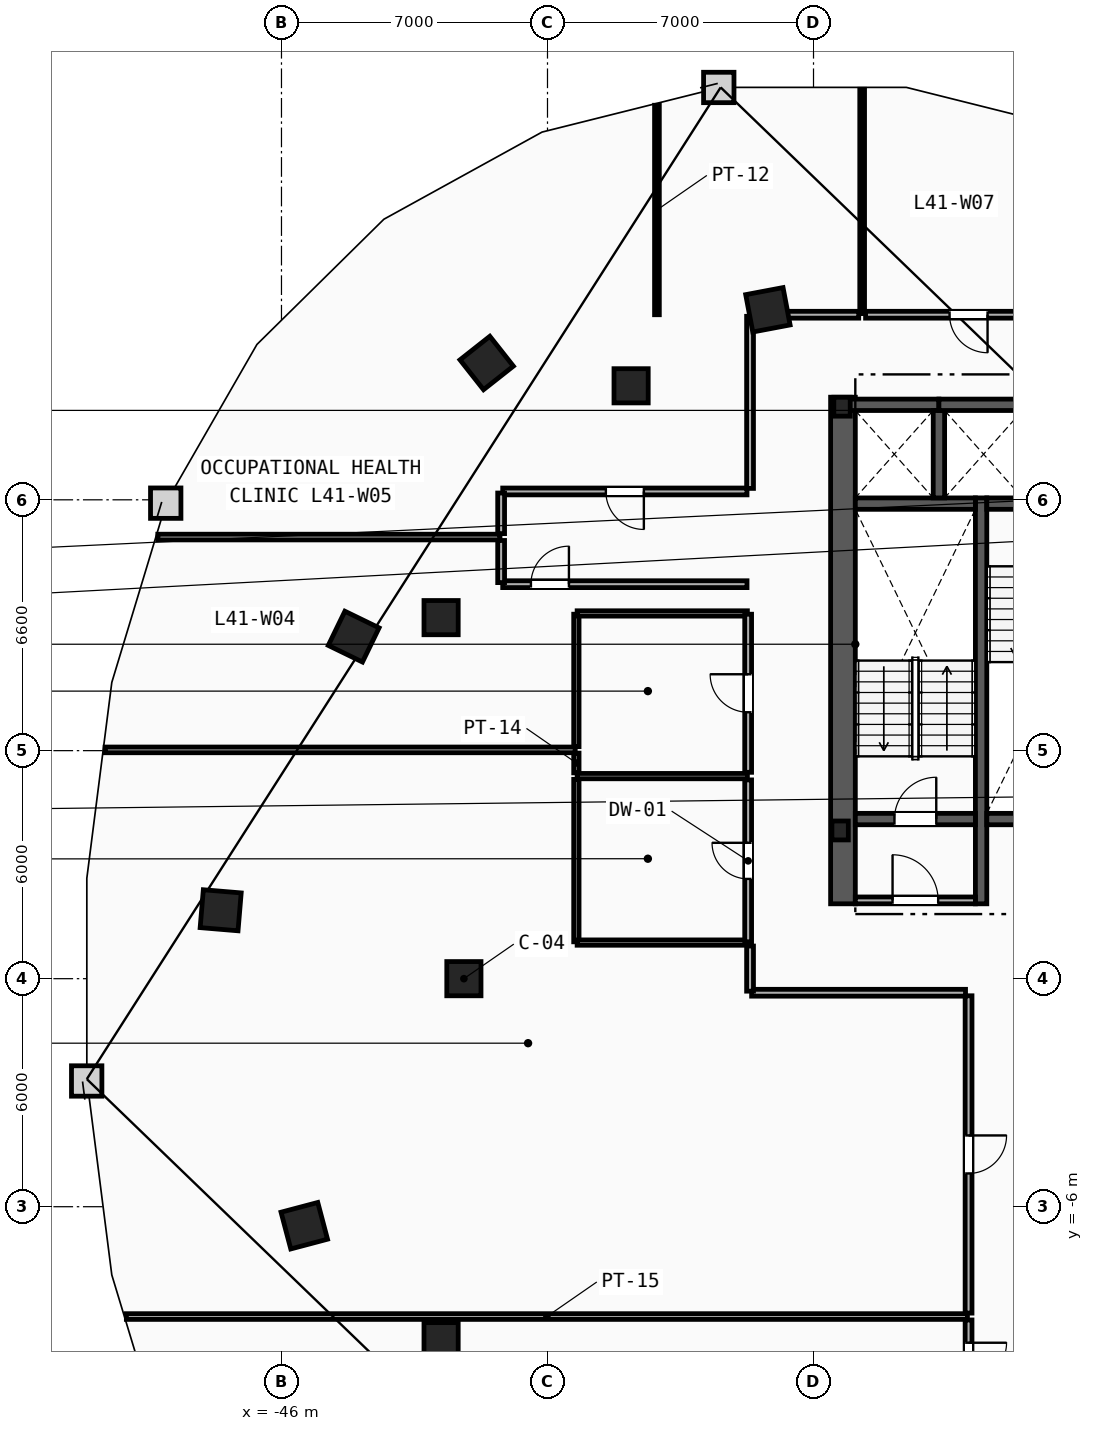
"""IFC4 building model, lengths in metres.
Left out: names, types, materials, properties, quantities, classifications, styles, units other than length and angle.
Written with IfcOpenShell. Run it as: python <this file> out.ifc"""

import sys

from ifc_helpers import new_model, si_unit, direction, frame, frame_2d, origin, origin_2d, place, context, subcontext, project, spatial, rectangle, i_section, extrude, element, fill, save


model = new_model("IFC4")
c1 = context("Model", 3, precision=1e-05, world=origin(), true_north=direction((0.0, 1.0)))
c2 = subcontext(c1, "Body", "Model", "MODEL_VIEW")
j1 = project(units=[si_unit("LENGTHUNIT", "METRE"), si_unit("PLANEANGLEUNIT", "RADIAN")], contexts=[c1])
p1 = place(None, origin())
s1 = spatial("IfcSite", under=j1, at=p1, CompositionType="ELEMENT")
p2 = place(p1, origin())
s2 = spatial("IfcBuilding", under=s1, at=p2, CompositionType="ELEMENT")
p3 = place(p2, frame((0.0, 0.0, 158.4)))
s3 = spatial("IfcBuildingStorey", under=s2, at=p3, CompositionType="ELEMENT", Elevation=158.4)
for number, where, z_axis, x_axis in (
    (1, (-31.3, 3.9, 0.0), (0.0, 0.0, 1.0), (1.0, 0.0, 0.0)),
    (2, (-31.25, 15.05, 0.0), (0.0, 0.0, 1.0), (1.0, 0.0, 0.0)),
):
    element("IfcColumn", number, at=place(p3, frame(where, z_axis=z_axis, x_axis=x_axis)), inside=s3, PredefinedType="COLUMN", context=c2, shape_type="SweptSolid", body=[
        extrude(i_section(OverallWidth=0.432, OverallDepth=0.498, WebThickness=0.056, FlangeThickness=0.089, FilletRadius=0.018, at=origin_2d()), origin(), (0.0, 0.0, 1.0), 3.6),
    ])
for number, where, z_axis, x_axis in (
    (3, (-41.2, 0.0, 0.0), (0.0, 0.0, 1.0), (1.0, 0.0, 0.0)),
    (4, (-41.8, 9.5, 0.0), (0.0, 0.0, 1.0), (1.0, 0.0, 0.0)),
    (5, (-36.8, 15.6, 0.0), (0.0, 0.0, 1.0), (1.0, 0.0, 0.0)),
    (6, (-41.8, -9.5, 0.0), (0.0, 0.0, 1.0), (1.0, 0.0, 0.0)),
):
    element("IfcColumn", number, at=place(p3, frame(where, z_axis=z_axis, x_axis=x_axis)), inside=s3, PredefinedType="COLUMN", context=c2, shape_type="SweptSolid", body=[
        extrude(rectangle(XDim=0.9, YDim=0.9, at=origin_2d()), origin(), (0.0, 0.0, 1.0), 3.6),
    ])
for number, where, z_axis, x_axis in (
    (7, (-33.2, 17.6, 0.0), (0.0, 0.0, 1.0), (-0.983, -0.186, 0.0)),
    (8, (-40.6, 16.2, 0.0), (0.0, 0.0, 1.0), (-0.785, -0.619, 0.0)),
    (9, (-44.1, 9.0, 0.0), (0.0, 0.0, 1.0), (-0.437, -0.899, 0.0)),
    (10, (-47.6, 1.8, 0.0), (0.0, 0.0, 1.0), (-0.084, -0.997, 0.0)),
    (11, (-45.4, -6.5, 0.0), (0.0, 0.0, 1.0), (0.256, -0.967, 0.0)),
):
    element("IfcColumn", number, at=place(p3, frame(where, z_axis=z_axis, x_axis=x_axis)), inside=s3, PredefinedType="COLUMN", context=c2, shape_type="SweptSolid", body=[
        extrude(rectangle(XDim=1.0, YDim=1.0, at=origin_2d()), origin(), (0.0, 0.0, 1.0), 3.6),
    ])
p4 = place(p3, frame((-31.225, 1.97, 0.0), z_axis=(0.0, 0.0, 1.0), x_axis=(0.0, 1.0, 0.0)))
e12 = element("IfcWall", 12, at=p4, inside=s3, PredefinedType="SHEAR", context=c2, shape_type="SweptSolid", body=[
    extrude(rectangle(XDim=13.33, YDim=0.65, at=frame_2d((6.665, 0.0))), origin(), (0.0, 0.0, 1.0), 3.36),
])
p5 = place(p3, frame((-27.59, 1.97, 0.0), z_axis=(0.0, 0.0, 1.0), x_axis=(0.0, 1.0, 0.0)))
e13 = element("IfcWall", 13, at=p5, inside=s3, PredefinedType="SHEAR", context=c2, shape_type="SweptSolid", body=[
    extrude(rectangle(XDim=10.68, YDim=0.3, at=frame_2d((5.34, 0.0))), origin(), (0.0, 0.0, 1.0), 3.36),
])
p6 = place(p3, frame((-30.9, 4.2, 0.0), z_axis=(0.0, 0.0, 1.0), x_axis=(1.0, 0.0, 0.0)))
e14 = element("IfcWall", 14, at=p6, inside=s3, PredefinedType="SHEAR", context=c2, shape_type="SweptSolid", body=[
    extrude(rectangle(XDim=3.16, YDim=0.3, at=frame_2d((1.58, 0.0))), origin(), (0.0, 0.0, 1.0), 3.36),
])
p7 = place(p6, frame((1.03, 0.0, 0.0)))
e15 = element("IfcOpeningElement", 15, at=p7, cuts=e14, PredefinedType="OPENING", context=c2, shape_type="SweptSolid", body=[
    extrude(rectangle(XDim=1.1, YDim=2.15, at=frame_2d((0.55, 1.075))), frame((0.0, 0.16, 0.0), z_axis=(0.0, -1.0, 0.0), x_axis=(1.0, 0.0, 0.0)), (0.0, 0.0, 1.0), 0.32),
])
p8 = place(p3, frame((-30.9, 12.5, 0.0), z_axis=(0.0, 0.0, 1.0), x_axis=(1.0, 0.0, 0.0)))
e16 = element("IfcWall", 16, at=p8, inside=s3, PredefinedType="SHEAR", context=c2, shape_type="SweptSolid", body=[
    extrude(rectangle(XDim=3.16, YDim=0.3, at=frame_2d((1.58, 0.0))), origin(), (0.0, 0.0, 1.0), 3.36),
])
p9 = place(p3, frame((-27.44, 12.5, 0.0), z_axis=(0.0, 0.0, 1.0), x_axis=(1.0, 0.0, 0.0)))
e17 = element("IfcWall", 17, at=p9, inside=s3, PredefinedType="SHEAR", context=c2, shape_type="SweptSolid", body=[
    extrude(rectangle(XDim=3.16, YDim=0.3, at=frame_2d((1.58, 0.0))), origin(), (0.0, 0.0, 1.0), 3.36),
])
p10 = place(p9, frame((1.03, 0.0, 0.0)))
e18 = element("IfcOpeningElement", 18, at=p10, cuts=e17, PredefinedType="OPENING", context=c2, shape_type="SweptSolid", body=[
    extrude(rectangle(XDim=1.1, YDim=2.15, at=frame_2d((0.55, 1.075))), frame((0.0, 0.16, 0.0), z_axis=(0.0, -1.0, 0.0), x_axis=(1.0, 0.0, 0.0)), (0.0, 0.0, 1.0), 0.32),
])
p11 = place(p3, frame((-27.44, 4.2, 0.0), z_axis=(0.0, 0.0, 1.0), x_axis=(1.0, 0.0, 0.0)))
e19 = element("IfcWall", 19, at=p11, inside=s3, PredefinedType="SHEAR", context=c2, shape_type="SweptSolid", body=[
    extrude(rectangle(XDim=3.16, YDim=0.3, at=frame_2d((1.58, 0.0))), origin(), (0.0, 0.0, 1.0), 3.36),
])
p12 = place(p3, frame((-30.9, 2.06, 0.0), z_axis=(0.0, 0.0, 1.0), x_axis=(1.0, 0.0, 0.0)))
e20 = element("IfcWall", 20, at=p12, inside=s3, PredefinedType="PARTITIONING", context=c2, shape_type="SweptSolid", body=[
    extrude(rectangle(XDim=3.16, YDim=0.18, at=frame_2d((1.58, 0.0))), origin(), (0.0, 0.0, 1.0), 3.36),
])
p13 = place(p12, frame((0.98, 0.0, 0.0)))
e21 = element("IfcOpeningElement", 21, at=p13, cuts=e20, PredefinedType="OPENING", context=c2, shape_type="SweptSolid", body=[
    extrude(rectangle(XDim=1.2, YDim=2.15, at=frame_2d((0.6, 1.075))), frame((0.0, 0.1, 0.0), z_axis=(0.0, -1.0, 0.0), x_axis=(1.0, 0.0, 0.0)), (0.0, 0.0, 1.0), 0.2),
])
p14 = place(p3, frame((-31.2, 15.1, 0.0), z_axis=(0.0, 0.0, 1.0), x_axis=(1.0, 0.0, 0.0)))
e22 = element("IfcWall", 22, at=p14, inside=s3, PredefinedType="SHEAR", context=c2, shape_type="SweptSolid", body=[
    extrude(rectangle(XDim=2.5, YDim=0.3, at=frame_2d((1.25, 0.0))), origin(), (0.0, 0.0, 1.0), 3.36),
])
p15 = place(p3, frame((-28.7, 12.65, 0.0), z_axis=(0.0, 0.0, 1.0), x_axis=(0.0, 1.0, 0.0)))
e23 = element("IfcWall", 23, at=p15, inside=s3, PredefinedType="SHEAR", context=c2, shape_type="SweptSolid", body=[
    extrude(rectangle(XDim=2.3, YDim=0.3, at=frame_2d((1.15, 0.0))), origin(), (0.0, 0.0, 1.0), 3.36),
])
p16 = place(p3, frame((-28.7, 15.1, 0.0), z_axis=(0.0, 0.0, 1.0), x_axis=(1.0, 0.0, 0.0)))
e24 = element("IfcWall", 24, at=p16, inside=s3, PredefinedType="SHEAR", context=c2, shape_type="SweptSolid", body=[
    extrude(rectangle(XDim=2.5, YDim=0.3, at=frame_2d((1.25, 0.0))), origin(), (0.0, 0.0, 1.0), 3.36),
])
p17 = place(p3, frame((-38.24, 0.97, 0.0), z_axis=(0.0, 0.0, 1.0), x_axis=(0.0, 1.0, 0.0)))
e25 = element("IfcWall", 25, at=p17, inside=s3, PredefinedType="PARTITIONING", context=c2, shape_type="SweptSolid", body=[
    extrude(rectangle(XDim=4.275, YDim=0.14, at=frame_2d((2.138, 0.0))), origin(), (0.0, 0.0, 1.0), 3.36),
])
p18 = place(p3, frame((-38.24, 5.415, 0.0), z_axis=(0.0, 0.0, 1.0), x_axis=(0.0, 1.0, 0.0)))
e26 = element("IfcWall", 26, at=p18, inside=s3, PredefinedType="PARTITIONING", context=c2, shape_type="SweptSolid", body=[
    extrude(rectangle(XDim=0.52, YDim=0.14, at=frame_2d((0.26, 0.0))), origin(), (0.0, 0.0, 1.0), 3.36),
])
p19 = place(p3, frame((-38.24, 6.105, 0.0), z_axis=(0.0, 0.0, 1.0), x_axis=(0.0, 1.0, 0.0)))
e27 = element("IfcWall", 27, at=p19, inside=s3, PredefinedType="PARTITIONING", context=c2, shape_type="SweptSolid", body=[
    extrude(rectangle(XDim=3.485, YDim=0.14, at=frame_2d((1.743, 0.0))), origin(), (0.0, 0.0, 1.0), 3.36),
])
for number, where, z_axis, x_axis in (
    (28, (-38.22, 0.95, 0.0), (0.0, 0.0, 1.0), (1.0, 0.0, 0.0)),
    (29, (-38.22, 5.33, 0.0), (0.0, 0.0, 1.0), (1.0, 0.0, 0.0)),
    (30, (-38.22, 9.61, 0.0), (0.0, 0.0, 1.0), (1.0, 0.0, 0.0)),
):
    element("IfcWall", number, at=place(p3, frame(where, z_axis=z_axis, x_axis=x_axis)), inside=s3, PredefinedType="PARTITIONING", context=c2, shape_type="SweptSolid", body=[
        extrude(rectangle(XDim=4.48, YDim=0.14, at=frame_2d((2.24, 0.0))), origin(), (0.0, 0.0, 1.0), 3.36),
    ])
p20 = place(p3, frame((-33.72, 0.97, 0.0), z_axis=(0.0, 0.0, 1.0), x_axis=(0.0, 1.0, 0.0)))
e31 = element("IfcWall", 31, at=p20, inside=s3, PredefinedType="PARTITIONING", context=c2, shape_type="SweptSolid", body=[
    extrude(rectangle(XDim=4.26, YDim=0.18, at=frame_2d((2.13, 0.0))), origin(), (0.0, 0.0, 1.0), 3.36),
])
p21 = place(p20, frame((1.655, 0.0, 0.0)))
e32 = element("IfcOpeningElement", 32, at=p21, cuts=e31, PredefinedType="OPENING", context=c2, shape_type="SweptSolid", body=[
    extrude(rectangle(XDim=0.95, YDim=2.1, at=frame_2d((0.475, 1.05))), frame((0.0, 0.1, 0.0), z_axis=(0.0, -1.0, 0.0), x_axis=(1.0, 0.0, 0.0)), (0.0, 0.0, 1.0), 0.2),
])
p22 = place(p3, frame((-33.72, 5.43, 0.0), z_axis=(0.0, 0.0, 1.0), x_axis=(0.0, 1.0, 0.0)))
e33 = element("IfcWall", 33, at=p22, inside=s3, PredefinedType="PARTITIONING", context=c2, shape_type="SweptSolid", body=[
    extrude(rectangle(XDim=4.16, YDim=0.18, at=frame_2d((2.08, 0.0))), origin(), (0.0, 0.0, 1.0), 3.36),
])
p23 = place(p22, frame((1.58, 0.0, 0.0)))
e34 = element("IfcOpeningElement", 34, at=p23, cuts=e33, PredefinedType="OPENING", context=c2, shape_type="SweptSolid", body=[
    extrude(rectangle(XDim=1.0, YDim=2.15, at=frame_2d((0.5, 1.075))), frame((0.0, 0.1, 0.0), z_axis=(0.0, -1.0, 0.0), x_axis=(1.0, 0.0, 0.0)), (0.0, 0.0, 1.0), 0.2),
])
p24 = place(p3, frame((-50.082, -8.89, 0.0), z_axis=(0.0, 0.0, 1.0), x_axis=(1.0, 0.0, 0.0)))
e35 = element("IfcWall", 35, at=p24, inside=s3, PredefinedType="PARTITIONING", context=c2, shape_type="SweptSolid", body=[
    extrude(rectangle(XDim=22.132, YDim=0.15, at=frame_2d((11.066, 0.0))), origin(), (0.0, 0.0, 1.0), 3.36),
])
p25 = place(p3, frame((-50.641, 6.02, 0.0), z_axis=(0.0, 0.0, 1.0), x_axis=(1.0, 0.0, 0.0)))
e36 = element("IfcWall", 36, at=p25, inside=s3, PredefinedType="PARTITIONING", context=c2, shape_type="SweptSolid", body=[
    extrude(rectangle(XDim=12.371, YDim=0.15, at=frame_2d((6.186, 0.0))), origin(), (0.0, 0.0, 1.0), 3.36),
])
p26 = place(p3, frame((-49.254, 11.62, 0.0), z_axis=(0.0, 0.0, 1.0), x_axis=(1.0, 0.0, 0.0)))
e37 = element("IfcWall", 37, at=p26, inside=s3, PredefinedType="PARTITIONING", context=c2, shape_type="SweptSolid", body=[
    extrude(rectangle(XDim=9.004, YDim=0.15, at=frame_2d((4.502, 0.0))), origin(), (0.0, 0.0, 1.0), 3.36),
])
p27 = place(p3, frame((-36.12, 17.47, 0.0), z_axis=(0.0, 0.0, 1.0), x_axis=(0.0, 1.0, 0.0)))
e38 = element("IfcWall", 38, at=p27, inside=s3, PredefinedType="PARTITIONING", context=c2, shape_type="SweptSolid", body=[
    extrude(rectangle(XDim=5.511, YDim=0.125, at=frame_2d((2.756, 0.0))), origin(), (0.0, 0.0, 1.0), 3.36),
])
p28 = place(p3, frame((-30.72, 17.5, 0.0), z_axis=(0.0, 0.0, 1.0), x_axis=(0.0, 1.0, 0.0)))
e39 = element("IfcWall", 39, at=p28, inside=s3, PredefinedType="PARTITIONING", context=c2, shape_type="SweptSolid", body=[
    extrude(rectangle(XDim=5.902, YDim=0.125, at=frame_2d((2.951, 0.0))), origin(), (0.0, 0.0, 1.0), 3.36),
])
p29 = place(p3, frame((-27.92, -8.98, 0.0), z_axis=(0.0, 0.0, 1.0), x_axis=(0.0, -1.0, 0.0)))
e40 = element("IfcWall", 40, at=p29, inside=s3, PredefinedType="PARTITIONING", context=c2, shape_type="SweptSolid", body=[
    extrude(rectangle(XDim=2.198, YDim=0.18, at=frame_2d((1.099, 0.0))), origin(), (0.0, 0.0, 1.0), 3.36),
])
p30 = place(p29, frame((0.599, 0.0, 0.0)))
e41 = element("IfcOpeningElement", 41, at=p30, cuts=e40, PredefinedType="OPENING", context=c2, shape_type="SweptSolid", body=[
    extrude(rectangle(XDim=1.0, YDim=2.15, at=frame_2d((0.5, 1.075))), frame((0.0, 0.1, 0.0), z_axis=(0.0, -1.0, 0.0), x_axis=(1.0, 0.0, 0.0)), (0.0, 0.0, 1.0), 0.2),
])
p31 = place(p3, frame((-27.92, -0.45, 0.0), z_axis=(0.0, 0.0, 1.0), x_axis=(0.0, -1.0, 0.0)))
e42 = element("IfcWall", 42, at=p31, inside=s3, PredefinedType="PARTITIONING", context=c2, shape_type="SweptSolid", body=[
    extrude(rectangle(XDim=8.35, YDim=0.18, at=frame_2d((4.175, 0.0))), origin(), (0.0, 0.0, 1.0), 3.36),
])
p32 = place(p31, frame((3.675, 0.0, 0.0)))
e43 = element("IfcOpeningElement", 43, at=p32, cuts=e42, PredefinedType="OPENING", context=c2, shape_type="SweptSolid", body=[
    extrude(rectangle(XDim=1.0, YDim=2.15, at=frame_2d((0.5, 1.075))), frame((0.0, 0.1, 0.0), z_axis=(0.0, -1.0, 0.0), x_axis=(1.0, 0.0, 0.0)), (0.0, 0.0, 1.0), 0.2),
])
p33 = place(p3, frame((-33.628, -0.37, 0.0), z_axis=(0.0, 0.0, 1.0), x_axis=(1.0, 0.0, 0.0)))
e44 = element("IfcWall", 44, at=p33, inside=s3, PredefinedType="PARTITIONING", context=c2, shape_type="SweptSolid", body=[
    extrude(rectangle(XDim=5.628, YDim=0.18, at=frame_2d((2.814, 0.0))), origin(), (0.0, 0.0, 1.0), 3.36),
])
p34 = place(p3, frame((-33.67, 0.859, 0.0), z_axis=(0.0, 0.0, 1.0), x_axis=(0.0, -1.0, 0.0)))
e45 = element("IfcWall", 45, at=p34, inside=s3, PredefinedType="PARTITIONING", context=c2, shape_type="SweptSolid", body=[
    extrude(rectangle(XDim=1.187, YDim=0.18, at=frame_2d((0.594, 0.0))), origin(), (0.0, 0.0, 1.0), 3.36),
])
p35 = place(p3, frame((-40.178, 10.38, 0.0), z_axis=(0.0, 0.0, 1.0), x_axis=(1.0, 0.0, 0.0)))
e46 = element("IfcWall", 46, at=p35, inside=s3, PredefinedType="PARTITIONING", context=c2, shape_type="SweptSolid", body=[
    extrude(rectangle(XDim=6.428, YDim=0.18, at=frame_2d((3.214, 0.0))), origin(), (0.0, 0.0, 1.0), 3.36),
])
p36 = place(p35, frame((0.743, 0.0, 0.0)))
e47 = element("IfcOpeningElement", 47, at=p36, cuts=e46, PredefinedType="OPENING", context=c2, shape_type="SweptSolid", body=[
    extrude(rectangle(XDim=1.0, YDim=2.15, at=frame_2d((0.5, 1.075))), frame((0.0, 0.1, 0.0), z_axis=(0.0, -1.0, 0.0), x_axis=(1.0, 0.0, 0.0)), (0.0, 0.0, 1.0), 0.2),
])
p37 = place(p3, frame((-40.22, 11.53, 0.0), z_axis=(0.0, 0.0, 1.0), x_axis=(0.0, -1.0, 0.0)))
e48 = element("IfcWall", 48, at=p37, inside=s3, PredefinedType="PARTITIONING", context=c2, shape_type="SweptSolid", body=[
    extrude(rectangle(XDim=1.109, YDim=0.18, at=frame_2d((0.554, 0.0))), origin(), (0.0, 0.0, 1.0), 3.36),
])
p38 = place(p3, frame((-33.75, 12.82, 0.0), z_axis=(0.0, 0.0, 1.0), x_axis=(-1.0, 0.0, 0.0)))
e49 = element("IfcWall", 49, at=p38, inside=s3, PredefinedType="PARTITIONING", context=c2, shape_type="SweptSolid", body=[
    extrude(rectangle(XDim=6.428, YDim=0.18, at=frame_2d((3.214, 0.0))), origin(), (0.0, 0.0, 1.0), 3.36),
])
p39 = place(p38, frame((2.714, 0.0, 0.0)))
e50 = element("IfcOpeningElement", 50, at=p39, cuts=e49, PredefinedType="OPENING", context=c2, shape_type="SweptSolid", body=[
    extrude(rectangle(XDim=1.0, YDim=2.15, at=frame_2d((0.5, 1.075))), frame((0.0, 0.1, 0.0), z_axis=(0.0, -1.0, 0.0), x_axis=(1.0, 0.0, 0.0)), (0.0, 0.0, 1.0), 0.2),
])
p40 = place(p3, frame((-33.67, 17.428, 0.0), z_axis=(0.0, 0.0, 1.0), x_axis=(0.0, -1.0, 0.0)))
e51 = element("IfcWall", 51, at=p40, inside=s3, PredefinedType="PARTITIONING", context=c2, shape_type="SweptSolid", body=[
    extrude(rectangle(XDim=4.529, YDim=0.18, at=frame_2d((2.264, 0.0))), origin(), (0.0, 0.0, 1.0), 3.36),
])
p41 = place(p3, frame((-30.81, 17.47, 0.0), z_axis=(0.0, 0.0, 1.0), x_axis=(-1.0, 0.0, 0.0)))
e52 = element("IfcWall", 52, at=p41, inside=s3, PredefinedType="PARTITIONING", context=c2, shape_type="SweptSolid", body=[
    extrude(rectangle(XDim=2.818, YDim=0.18, at=frame_2d((1.409, 0.0))), origin(), (0.0, 0.0, 1.0), 3.36),
])
p42 = place(p3, frame((-40.22, 12.779, 0.0), z_axis=(0.0, 0.0, 1.0), x_axis=(0.0, -1.0, 0.0)))
e53 = element("IfcWall", 53, at=p42, inside=s3, PredefinedType="PARTITIONING", context=c2, shape_type="SweptSolid", body=[
    extrude(rectangle(XDim=1.069, YDim=0.18, at=frame_2d((0.534, 0.0))), origin(), (0.0, 0.0, 1.0), 3.36),
])
p43 = place(p3, frame((-25.21, 17.47, 0.0), z_axis=(0.0, 0.0, 1.0), x_axis=(-1.0, 0.0, 0.0)))
e54 = element("IfcWall", 54, at=p43, inside=s3, PredefinedType="PARTITIONING", context=c2, shape_type="SweptSolid", body=[
    extrude(rectangle(XDim=5.42, YDim=0.18, at=frame_2d((2.71, 0.0))), origin(), (0.0, 0.0, 1.0), 3.36),
])
p44 = place(p43, frame((2.21, 0.0, 0.0)))
e55 = element("IfcOpeningElement", 55, at=p44, cuts=e54, PredefinedType="OPENING", context=c2, shape_type="SweptSolid", body=[
    extrude(rectangle(XDim=1.0, YDim=2.15, at=frame_2d((0.5, 1.075))), frame((0.0, 0.1, 0.0), z_axis=(0.0, -1.0, 0.0), x_axis=(1.0, 0.0, 0.0)), (0.0, 0.0, 1.0), 0.2),
])
p45 = place(p7, origin())
e56 = element("IfcDoor", 56, at=p45, inside=s3, OperationType="SINGLE_SWING_RIGHT", PredefinedType="DOOR", context=c2, shape_type="SweptSolid", body=[
    extrude(rectangle(XDim=1.1, YDim=2.15, at=frame_2d((0.55, 1.075))), frame((0.0, 0.025, 0.0), z_axis=(0.0, -1.0, 0.0), x_axis=(1.0, 0.0, 0.0)), (0.0, 0.0, 1.0), 0.05),
])
fill(e15, e56)
p46 = place(p13, origin())
e57 = element("IfcDoor", 57, at=p46, inside=s3, OperationType="SINGLE_SWING_LEFT", PredefinedType="DOOR", context=c2, shape_type="SweptSolid", body=[
    extrude(rectangle(XDim=1.2, YDim=2.15, at=frame_2d((0.6, 1.075))), frame((0.0, 0.025, 0.0), z_axis=(0.0, -1.0, 0.0), x_axis=(1.0, 0.0, 0.0)), (0.0, 0.0, 1.0), 0.05),
])
fill(e21, e57)
p47 = place(p32, origin())
e58 = element("IfcDoor", 58, at=p47, inside=s3, OperationType="SINGLE_SWING_LEFT", PredefinedType="DOOR", context=c2, shape_type="SweptSolid", body=[
    extrude(rectangle(XDim=1.0, YDim=2.15, at=frame_2d((0.5, 1.075))), frame((0.0, 0.025, 0.0), z_axis=(0.0, -1.0, 0.0), x_axis=(1.0, 0.0, 0.0)), (0.0, 0.0, 1.0), 0.05),
])
fill(e43, e58)
p48 = place(p36, origin())
e59 = element("IfcDoor", 59, at=p48, inside=s3, OperationType="SINGLE_SWING_RIGHT", PredefinedType="DOOR", context=c2, shape_type="SweptSolid", body=[
    extrude(rectangle(XDim=1.0, YDim=2.15, at=frame_2d((0.5, 1.075))), frame((0.0, 0.025, 0.0), z_axis=(0.0, -1.0, 0.0), x_axis=(1.0, 0.0, 0.0)), (0.0, 0.0, 1.0), 0.05),
])
fill(e47, e59)
p49 = place(p39, origin())
e60 = element("IfcDoor", 60, at=p49, inside=s3, OperationType="SINGLE_SWING_LEFT", PredefinedType="DOOR", context=c2, shape_type="SweptSolid", body=[
    extrude(rectangle(XDim=1.0, YDim=2.15, at=frame_2d((0.5, 1.075))), frame((0.0, 0.025, 0.0), z_axis=(0.0, -1.0, 0.0), x_axis=(1.0, 0.0, 0.0)), (0.0, 0.0, 1.0), 0.05),
])
fill(e50, e60)
p50 = place(p44, origin())
e61 = element("IfcDoor", 61, at=p50, inside=s3, OperationType="SINGLE_SWING_LEFT", PredefinedType="DOOR", context=c2, shape_type="SweptSolid", body=[
    extrude(rectangle(XDim=1.0, YDim=2.15, at=frame_2d((0.5, 1.075))), frame((0.0, 0.025, 0.0), z_axis=(0.0, -1.0, 0.0), x_axis=(1.0, 0.0, 0.0)), (0.0, 0.0, 1.0), 0.05),
])
fill(e55, e61)
p51 = place(p21, origin())
e62 = element("IfcDoor", 62, at=p51, inside=s3, OperationType="SINGLE_SWING_RIGHT", PredefinedType="DOOR", context=c2, shape_type="SweptSolid", body=[
    extrude(rectangle(XDim=0.95, YDim=2.1, at=frame_2d((0.475, 1.05))), frame((0.0, 0.025, 0.0), z_axis=(0.0, -1.0, 0.0), x_axis=(1.0, 0.0, 0.0)), (0.0, 0.0, 1.0), 0.05),
])
fill(e32, e62)
p52 = place(p23, origin())
e63 = element("IfcDoor", 63, at=p52, inside=s3, OperationType="SINGLE_SWING_RIGHT", PredefinedType="DOOR", context=c2, shape_type="SweptSolid", body=[
    extrude(rectangle(XDim=1.0, YDim=2.15, at=frame_2d((0.5, 1.075))), frame((0.0, 0.025, 0.0), z_axis=(0.0, -1.0, 0.0), x_axis=(1.0, 0.0, 0.0)), (0.0, 0.0, 1.0), 0.05),
])
fill(e34, e63)
p53 = place(p30, origin())
e64 = element("IfcDoor", 64, at=p53, inside=s3, OperationType="SINGLE_SWING_LEFT", PredefinedType="DOOR", context=c2, shape_type="SweptSolid", body=[
    extrude(rectangle(XDim=1.0, YDim=2.15, at=frame_2d((0.5, 1.075))), frame((0.0, 0.025, 0.0), z_axis=(0.0, -1.0, 0.0), x_axis=(1.0, 0.0, 0.0)), (0.0, 0.0, 1.0), 0.05),
])
fill(e41, e64)
save(model, sys.argv[1])
